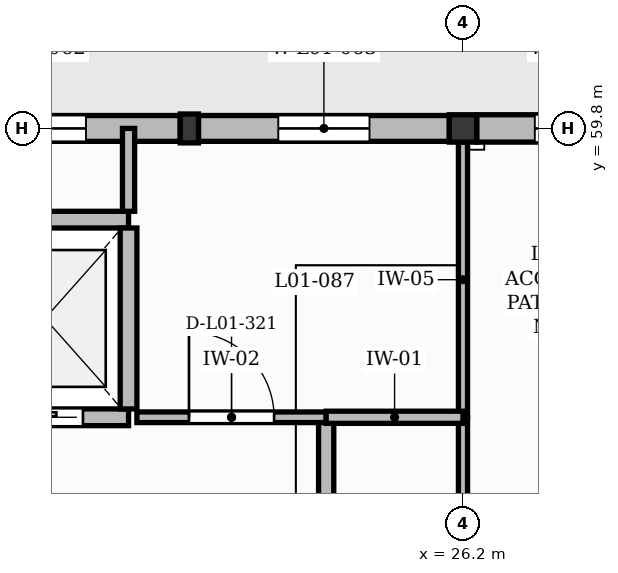
"""IFC4 building model, lengths in metres.
Left out: names, types, materials, properties, quantities, classifications, styles, units other than length and angle.
Written with IfcOpenShell. Run it as: python <this file> out.ifc"""

import sys

from ifc_helpers import new_model, si_unit, direction, frame, frame_2d, origin, origin_2d, place, context, subcontext, project, spatial, rectangle, extrude, element, fill, save


model = new_model("IFC4")
c1 = context("Model", 3, precision=1e-05, world=origin(), true_north=direction((0.0, 1.0)))
c2 = subcontext(c1, "Body", "Model", "MODEL_VIEW")
j1 = project(units=[si_unit("LENGTHUNIT", "METRE"), si_unit("PLANEANGLEUNIT", "RADIAN")], contexts=[c1])
p1 = place(None, origin())
s1 = spatial("IfcSite", under=j1, at=p1, CompositionType="ELEMENT")
p2 = place(p1, origin())
s2 = spatial("IfcBuilding", under=s1, at=p2, CompositionType="ELEMENT")
p3 = place(p2, frame((0.0, 0.0, 4.5)))
s3 = spatial("IfcBuildingStorey", under=s2, at=p3, CompositionType="ELEMENT", Elevation=4.5)
p4 = place(p3, frame((26.2, 59.8, 0.0), z_axis=(0.0, 0.0, 1.0), x_axis=(1.0, 0.0, 0.0)))
e1 = element("IfcColumn", 1, at=p4, inside=s3, PredefinedType="COLUMN", context=c2, shape_type="SweptSolid", body=[
    extrude(rectangle(XDim=0.36, YDim=0.36, at=origin_2d()), origin(), (0.0, 0.0, 1.0), 4.26),
])
p5 = place(p3, frame((22.6, 59.8, 0.0), z_axis=(0.0, 0.0, 1.0), x_axis=(1.0, 0.0, 0.0)))
e2 = element("IfcColumn", 2, at=p5, inside=s3, PredefinedType="PILASTER", context=c2, shape_type="SweptSolid", body=[
    extrude(rectangle(XDim=0.24, YDim=0.38, at=origin_2d()), origin(), (0.0, 0.0, 1.0), 4.26),
])
p6 = place(p3, frame((19.16, 59.8, 0.0), z_axis=(0.0, 0.0, 1.0), x_axis=(1.0, 0.0, 0.0)))
e3 = element("IfcWall", 3, at=p6, inside=s3, PredefinedType="SOLIDWALL", context=c2, shape_type="SweptSolid", body=[
    extrude(rectangle(XDim=3.32, YDim=0.34, at=frame_2d((1.66, 0.0))), origin(), (0.0, 0.0, 1.0), 3.8),
])
p7 = place(p6, frame((0.68, 0.0, 1.05)))
e4 = element("IfcOpeningElement", 4, at=p7, cuts=e3, PredefinedType="OPENING", context=c2, shape_type="SweptSolid", body=[
    extrude(rectangle(XDim=1.4, YDim=1.65, at=frame_2d((0.7, 0.825))), frame((0.0, 0.18, 0.0), z_axis=(0.0, -1.0, 0.0), x_axis=(1.0, 0.0, 0.0)), (0.0, 0.0, 1.0), 0.36),
])
p8 = place(p3, frame((22.72, 59.8, 0.0), z_axis=(0.0, 0.0, 1.0), x_axis=(1.0, 0.0, 0.0)))
e5 = element("IfcWall", 5, at=p8, inside=s3, PredefinedType="SOLIDWALL", context=c2, shape_type="SweptSolid", body=[
    extrude(rectangle(XDim=3.3, YDim=0.34, at=frame_2d((1.65, 0.0))), origin(), (0.0, 0.0, 1.0), 3.8),
])
p9 = place(p8, frame((1.05, 0.0, 1.0)))
e6 = element("IfcOpeningElement", 6, at=p9, cuts=e5, PredefinedType="OPENING", context=c2, shape_type="SweptSolid", body=[
    extrude(rectangle(XDim=1.2, YDim=1.95, at=frame_2d((0.6, 0.975))), frame((0.0, 0.18, 0.0), z_axis=(0.0, -1.0, 0.0), x_axis=(1.0, 0.0, 0.0)), (0.0, 0.0, 1.0), 0.36),
])
p10 = place(p3, frame((26.38, 59.8, 0.0), z_axis=(0.0, 0.0, 1.0), x_axis=(1.0, 0.0, 0.0)))
e7 = element("IfcWall", 7, at=p10, inside=s3, PredefinedType="SOLIDWALL", context=c2, shape_type="SweptSolid", body=[
    extrude(rectangle(XDim=6.86, YDim=0.36, at=frame_2d((3.43, 0.0))), origin(), (0.0, 0.0, 1.0), 3.8),
])
p11 = place(p10, frame((0.765, 0.0, 1.05)))
e8 = element("IfcOpeningElement", 8, at=p11, cuts=e7, PredefinedType="OPENING", context=c2, shape_type="SweptSolid", body=[
    extrude(rectangle(XDim=1.26, YDim=1.65, at=frame_2d((0.63, 0.825))), frame((0.0, 0.19, 0.0), z_axis=(0.0, -1.0, 0.0), x_axis=(1.0, 0.0, 0.0)), (0.0, 0.0, 1.0), 0.38),
])
p12 = place(p10, frame((4.035, 0.0, 1.0)))
e9 = element("IfcOpeningElement", 9, at=p12, cuts=e7, PredefinedType="OPENING", context=c2, shape_type="SweptSolid", body=[
    extrude(rectangle(XDim=1.34, YDim=1.95, at=frame_2d((0.67, 0.975))), frame((0.0, 0.19, 0.0), z_axis=(0.0, -1.0, 0.0), x_axis=(1.0, 0.0, 0.0)), (0.0, 0.0, 1.0), 0.38),
])
p13 = place(p3, frame((19.6, 56.0, 0.0), z_axis=(0.0, 0.0, 1.0), x_axis=(1.0, 0.0, 0.0)))
e10 = element("IfcWall", 10, at=p13, inside=s3, PredefinedType="SOLIDWALL", context=c2, shape_type="SweptSolid", body=[
    extrude(rectangle(XDim=2.2, YDim=0.22, at=frame_2d((1.1, 0.0))), origin(), (0.0, 0.0, 1.0), 4.25),
])
p14 = place(p13, frame((0.6, 0.0, 0.0)))
e11 = element("IfcOpeningElement", 11, at=p14, cuts=e10, PredefinedType="OPENING", context=c2, shape_type="SweptSolid", body=[
    extrude(rectangle(XDim=1.0, YDim=2.15, at=frame_2d((0.5, 1.075))), frame((0.0, 0.12, 0.0), z_axis=(0.0, -1.0, 0.0), x_axis=(1.0, 0.0, 0.0)), (0.0, 0.0, 1.0), 0.24),
])
p15 = place(p3, frame((19.6, 58.6, 0.0), z_axis=(0.0, 0.0, 1.0), x_axis=(1.0, 0.0, 0.0)))
e12 = element("IfcWall", 12, at=p15, inside=s3, PredefinedType="SOLIDWALL", context=c2, shape_type="SweptSolid", body=[
    extrude(rectangle(XDim=2.2, YDim=0.22, at=frame_2d((1.1, 0.0))), origin(), (0.0, 0.0, 1.0), 4.25),
])
p16 = place(p3, frame((21.8, 56.11, 0.0), z_axis=(0.0, 0.0, 1.0), x_axis=(0.0, 1.0, 0.0)))
e13 = element("IfcWall", 13, at=p16, inside=s3, PredefinedType="SOLIDWALL", context=c2, shape_type="SweptSolid", body=[
    extrude(rectangle(XDim=2.38, YDim=0.22, at=frame_2d((1.19, 0.0))), origin(), (0.0, 0.0, 1.0), 4.25),
])
p17 = place(p3, frame((21.91, 56.0, 0.0), z_axis=(0.0, 0.0, 1.0), x_axis=(1.0, 0.0, 0.0)))
e14 = element("IfcWall", 14, at=p17, inside=s3, PredefinedType="PARTITIONING", context=c2, shape_type="SweptSolid", body=[
    extrude(rectangle(XDim=2.49, YDim=0.14, at=frame_2d((1.245, 0.0))), origin(), (0.0, 0.0, 1.0), 4.18),
])
p18 = place(p17, frame((0.685, 0.0, 0.0)))
e15 = element("IfcOpeningElement", 15, at=p18, cuts=e14, PredefinedType="OPENING", context=c2, shape_type="SweptSolid", body=[
    extrude(rectangle(XDim=1.12, YDim=2.15, at=frame_2d((0.56, 1.075))), frame((0.0, 0.08, 0.0), z_axis=(0.0, -1.0, 0.0), x_axis=(1.0, 0.0, 0.0)), (0.0, 0.0, 1.0), 0.16),
])
p19 = place(p3, frame((26.2, 56.0, 0.0), z_axis=(0.0, 0.0, 1.0), x_axis=(0.0, 1.0, 0.0)))
e16 = element("IfcWall", 16, at=p19, inside=s3, PredefinedType="PLUMBINGWALL", context=c2, shape_type="SweptSolid", body=[
    extrude(rectangle(XDim=3.62, YDim=0.12, at=frame_2d((1.81, 0.0))), origin(), (0.0, 0.0, 1.0), 3.74),
])
p20 = place(p3, frame((24.4, 53.27, 0.0), z_axis=(0.0, 0.0, 1.0), x_axis=(0.0, 1.0, 0.0)))
e17 = element("IfcWall", 17, at=p20, inside=s3, PredefinedType="PARTITIONING", context=c2, shape_type="SweptSolid", body=[
    extrude(rectangle(XDim=2.66, YDim=0.2, at=frame_2d((1.33, 0.0))), origin(), (0.0, 0.0, 1.0), 4.18),
])
p21 = place(p3, frame((26.2, 53.27, 0.0), z_axis=(0.0, 0.0, 1.0), x_axis=(0.0, 1.0, 0.0)))
e18 = element("IfcWall", 18, at=p21, inside=s3, PredefinedType="PLUMBINGWALL", context=c2, shape_type="SweptSolid", body=[
    extrude(rectangle(XDim=2.73, YDim=0.12, at=frame_2d((1.365, 0.0))), origin(), (0.0, 0.0, 1.0), 3.74),
])
p22 = place(p3, frame((24.4, 56.0, 0.0), z_axis=(0.0, 0.0, 1.0), x_axis=(1.0, 0.0, 0.0)))
e19 = element("IfcWall", 19, at=p22, inside=s3, PredefinedType="PARTITIONING", context=c2, shape_type="SweptSolid", body=[
    extrude(rectangle(XDim=1.8, YDim=0.16, at=frame_2d((0.9, 0.0))), origin(), (0.0, 0.0, 1.0), 4.18),
])
p23 = place(p3, frame((21.8, 58.71, 0.0), z_axis=(0.0, 0.0, 1.0), x_axis=(0.0, 1.0, 0.0)))
e20 = element("IfcWall", 20, at=p23, inside=s3, PredefinedType="PARTITIONING", context=c2, shape_type="SweptSolid", body=[
    extrude(rectangle(XDim=1.09, YDim=0.16, at=frame_2d((0.545, 0.0))), origin(), (0.0, 0.0, 1.0), 4.18),
])
p24 = place(p7, origin())
e21 = element("IfcWindow", 21, at=p24, inside=s3, PartitioningType="SINGLE_PANEL", PredefinedType="WINDOW", context=c2, shape_type="SweptSolid", body=[
    extrude(rectangle(XDim=1.4, YDim=1.65, at=frame_2d((0.7, 0.825))), frame((0.0, 0.03, 0.0), z_axis=(0.0, -1.0, 0.0), x_axis=(1.0, 0.0, 0.0)), (0.0, 0.0, 1.0), 0.06),
])
fill(e4, e21)
p25 = place(p9, origin())
e22 = element("IfcWindow", 22, at=p25, inside=s3, PartitioningType="SINGLE_PANEL", PredefinedType="WINDOW", context=c2, shape_type="SweptSolid", body=[
    extrude(rectangle(XDim=1.2, YDim=1.95, at=frame_2d((0.6, 0.975))), frame((0.0, 0.03, 0.0), z_axis=(0.0, -1.0, 0.0), x_axis=(1.0, 0.0, 0.0)), (0.0, 0.0, 1.0), 0.06),
])
fill(e6, e22)
p26 = place(p11, origin())
e23 = element("IfcWindow", 23, at=p26, inside=s3, PartitioningType="SINGLE_PANEL", PredefinedType="WINDOW", context=c2, shape_type="SweptSolid", body=[
    extrude(rectangle(XDim=1.26, YDim=1.65, at=frame_2d((0.63, 0.825))), frame((0.0, 0.03, 0.0), z_axis=(0.0, -1.0, 0.0), x_axis=(1.0, 0.0, 0.0)), (0.0, 0.0, 1.0), 0.06),
])
fill(e8, e23)
p27 = place(p14, origin())
e24 = element("IfcDoor", 24, at=p27, inside=s3, OperationType="SLIDING_TO_LEFT", PredefinedType="DOOR", context=c2, shape_type="SweptSolid", body=[
    extrude(rectangle(XDim=1.0, YDim=2.15, at=frame_2d((0.5, 1.075))), frame((0.0, 0.025, 0.0), z_axis=(0.0, -1.0, 0.0), x_axis=(1.0, 0.0, 0.0)), (0.0, 0.0, 1.0), 0.05),
])
fill(e11, e24)
p28 = place(p18, origin())
e25 = element("IfcDoor", 25, at=p28, inside=s3, OperationType="SINGLE_SWING_LEFT", PredefinedType="DOOR", context=c2, shape_type="SweptSolid", body=[
    extrude(rectangle(XDim=1.12, YDim=2.15, at=frame_2d((0.56, 1.075))), frame((0.0, 0.025, 0.0), z_axis=(0.0, -1.0, 0.0), x_axis=(1.0, 0.0, 0.0)), (0.0, 0.0, 1.0), 0.05),
])
fill(e15, e25)
save(model, sys.argv[1])
